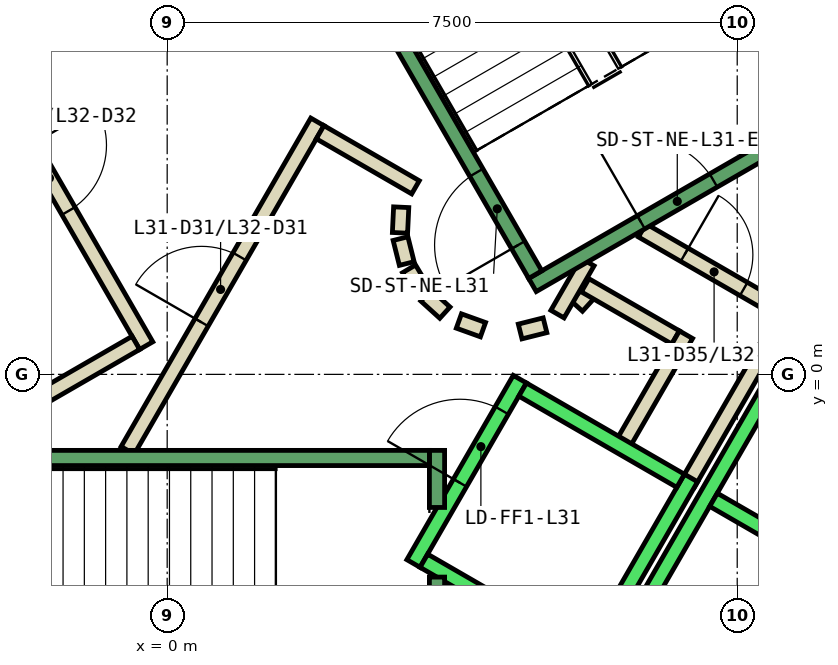
"""IFC4 building model, lengths in metres.
Left out: names, types, materials, properties, quantities, classifications, styles, units other than length and angle.
Written with IfcOpenShell. Run it as: python <this file> out.ifc"""

import sys

from ifc_helpers import new_model, si_unit, direction, frame, frame_2d, origin, place, context, subcontext, project, spatial, rectangle, extrude, element, fill, save


model = new_model("IFC4")
c1 = context("Model", 3, precision=1e-05, world=origin(), true_north=direction((0.0, 1.0)))
c2 = subcontext(c1, "Body", "Model", "MODEL_VIEW")
j1 = project(units=[si_unit("LENGTHUNIT", "METRE"), si_unit("PLANEANGLEUNIT", "RADIAN")], contexts=[c1])
p1 = place(None, origin())
s1 = spatial("IfcSite", under=j1, at=p1, CompositionType="ELEMENT")
p2 = place(p1, origin())
s2 = spatial("IfcBuilding", under=s1, at=p2, CompositionType="ELEMENT")
p3 = place(p2, frame((0.0, 0.0, 142.4)))
s3 = spatial("IfcBuildingStorey", under=s2, at=p3, CompositionType="ELEMENT", Elevation=142.4)
p4 = place(p3, frame((5.39, 0.898, 0.0), z_axis=(0.0, 0.0, 1.0), x_axis=(0.673828488714, 0.738887791073, 0.0)))
e1 = element("IfcWall", 1, at=p4, inside=s3, PredefinedType="PARTITIONING", context=c2, shape_type="SweptSolid", body=[
    extrude(rectangle(XDim=0.263, YDim=0.2, at=frame_2d((0.131, 0.0))), origin(), (0.0, 0.0, 1.0), 3.8),
])
p5 = place(p3, frame((5.499, 1.172, 0.0), z_axis=(0.0, 0.0, 1.0), x_axis=(0.866333505267, -0.499465972466, 0.0)))
e2 = element("IfcWall", 2, at=p5, inside=s3, PredefinedType="PARTITIONING", context=c2, shape_type="SweptSolid", body=[
    extrude(rectangle(XDim=1.374, YDim=0.2, at=frame_2d((0.687, 0.0))), origin(), (0.0, 0.0, 1.0), 3.8),
])
p6 = place(p3, frame((6.826, 0.522, 0.0), z_axis=(0.0, 0.0, 1.0), x_axis=(-0.500016722714, -0.866015748706, 0.0)))
e3 = element("IfcWall", 3, at=p6, inside=s3, PredefinedType="PARTITIONING", context=c2, shape_type="SweptSolid", body=[
    extrude(rectangle(XDim=1.7, YDim=0.2, at=frame_2d((0.85, 0.0))), origin(), (0.0, 0.0, 1.0), 3.8),
])
p7 = place(p3, frame((6.25, 1.894, 0.0), z_axis=(0.0, 0.0, 1.0), x_axis=(0.866043184279, -0.499969202016, 0.0)))
e4 = element("IfcWall", 4, at=p7, inside=s3, PredefinedType="PARTITIONING", context=c2, shape_type="SweptSolid", body=[
    extrude(rectangle(XDim=2.084, YDim=0.2, at=frame_2d((1.042, 0.0))), origin(), (0.0, 0.0, 1.0), 3.8),
])
p8 = place(p7, frame((0.642, 0.0, 0.0)))
e5 = element("IfcOpeningElement", 5, at=p8, cuts=e4, PredefinedType="OPENING", context=c2, shape_type="SweptSolid", body=[
    extrude(rectangle(XDim=0.9, YDim=2.1, at=frame_2d((0.45, 1.05))), frame((0.0, 0.11, 0.0), z_axis=(0.0, -1.0, 0.0), x_axis=(1.0, 0.0, 0.0)), (0.0, 0.0, 1.0), 0.22),
])
p9 = place(p3, frame((8.192, 0.888, 0.0), z_axis=(0.0, 0.0, 1.0), x_axis=(-0.499940625693, -0.866059680843, 0.0)))
e6 = element("IfcWall", 6, at=p9, inside=s3, PredefinedType="PARTITIONING", context=c2, shape_type="SweptSolid", body=[
    extrude(rectangle(XDim=2.68, YDim=0.2, at=frame_2d((1.34, 0.0))), origin(), (0.0, 0.0, 1.0), 3.8),
])
p10 = place(p3, frame((5.135, 0.793, 0.0), z_axis=(0.0, 0.0, 1.0), x_axis=(0.499526442893, 0.866298639529, 0.0)))
e7 = element("IfcWall", 7, at=p10, inside=s3, PredefinedType="PARTITIONING", context=c2, shape_type="SweptSolid", body=[
    extrude(rectangle(XDim=0.791, YDim=0.2, at=frame_2d((0.396, 0.0))), origin(), (0.0, 0.0, 1.0), 3.8),
])
p11 = place(p3, frame((-0.52, -1.0, 0.0), z_axis=(0.0, 0.0, 1.0), x_axis=(0.50011622646, 0.865958290007, 0.0)))
e8 = element("IfcWall", 8, at=p11, inside=s3, PredefinedType="PARTITIONING", context=c2, shape_type="SweptSolid", body=[
    extrude(rectangle(XDim=4.991, YDim=0.2, at=frame_2d((2.496, 0.0))), origin(), (0.0, 0.0, 1.0), 3.8),
])
p12 = place(p11, frame((1.945, 0.0, 0.0)))
e9 = element("IfcOpeningElement", 9, at=p12, cuts=e8, PredefinedType="OPENING", context=c2, shape_type="SweptSolid", body=[
    extrude(rectangle(XDim=1.0, YDim=2.1, at=frame_2d((0.5, 1.05))), frame((0.0, 0.11, 0.0), z_axis=(0.0, -1.0, 0.0), x_axis=(1.0, 0.0, 0.0)), (0.0, 0.0, 1.0), 0.22),
])
p13 = place(p3, frame((2.012, 3.186, 0.0), z_axis=(0.0, 0.0, 1.0), x_axis=(0.865891012941, -0.500232699559, 0.0)))
e10 = element("IfcWall", 10, at=p13, inside=s3, PredefinedType="PARTITIONING", context=c2, shape_type="SweptSolid", body=[
    extrude(rectangle(XDim=1.449, YDim=0.2, at=frame_2d((0.725, 0.0))), origin(), (0.0, 0.0, 1.0), 3.8),
])
p14 = place(p3, frame((3.079, 2.199, 0.0), z_axis=(0.0, 0.0, 1.0), x_axis=(-0.047771483479, -0.998858290933, 0.0)))
e11 = element("IfcWall", 11, at=p14, inside=s3, PredefinedType="PARTITIONING", context=c2, shape_type="SweptSolid", body=[
    extrude(rectangle(XDim=0.337, YDim=0.2, at=frame_2d((0.169, 0.0))), origin(), (0.0, 0.0, 1.0), 3.8),
])
p15 = place(p3, frame((3.07, 1.786, 0.0), z_axis=(0.0, 0.0, 1.0), x_axis=(0.242705583207, -0.970099994784, 0.0)))
e12 = element("IfcWall", 12, at=p15, inside=s3, PredefinedType="PARTITIONING", context=c2, shape_type="SweptSolid", body=[
    extrude(rectangle(XDim=0.338, YDim=0.2, at=frame_2d((0.169, 0.0))), origin(), (0.0, 0.0, 1.0), 3.8),
])
for number, where, z_axis, x_axis in (
    (13, (3.182, 1.388, 0.0), (0.0, 0.0, 1.0), (0.512, -0.859, 0.0)),
    (14, (3.404, 1.039, 0.0), (0.0, 0.0, 1.0), (0.74, -0.672, 0.0)),
):
    element("IfcWall", number, at=place(p3, frame(where, z_axis=z_axis, x_axis=x_axis)), inside=s3, PredefinedType="PARTITIONING", context=c2, shape_type="SweptSolid", body=[
        extrude(rectangle(XDim=0.338, YDim=0.2, at=frame_2d((0.169, 0.0))), origin(), (0.0, 0.0, 1.0), 3.8),
    ])
p16 = place(p3, frame((3.838, 0.702, 0.0), z_axis=(0.0, 0.0, 1.0), x_axis=(0.941035081519, -0.338308993895, 0.0)))
e15 = element("IfcWall", 15, at=p16, inside=s3, PredefinedType="PARTITIONING", context=c2, shape_type="SweptSolid", body=[
    extrude(rectangle(XDim=0.337, YDim=0.2, at=frame_2d((0.168, 0.0))), origin(), (0.0, 0.0, 1.0), 3.8),
])
p17 = place(p3, frame((4.644, 0.564, 0.0), z_axis=(0.0, 0.0, 1.0), x_axis=(0.969929076366, 0.243387729394, 0.0)))
e16 = element("IfcWall", 16, at=p17, inside=s3, PredefinedType="PARTITIONING", context=c2, shape_type="SweptSolid", body=[
    extrude(rectangle(XDim=0.337, YDim=0.2, at=frame_2d((0.168, 0.0))), origin(), (0.0, 0.0, 1.0), 3.8),
])
p18 = place(p3, frame((-2.771, 4.7, 0.0), z_axis=(0.0, 0.0, 1.0), x_axis=(0.499969479948, -0.866043023828, 0.0)))
e17 = element("IfcWall", 17, at=p18, inside=s3, PredefinedType="PARTITIONING", context=c2, shape_type="SweptSolid", body=[
    extrude(rectangle(XDim=4.99, YDim=0.2, at=frame_2d((2.495, 0.0))), origin(), (0.0, 0.0, 1.0), 3.8),
])
p19 = place(p18, frame((1.945, 0.0, 0.0)))
e18 = element("IfcOpeningElement", 18, at=p19, cuts=e17, PredefinedType="OPENING", context=c2, shape_type="SweptSolid", body=[
    extrude(rectangle(XDim=1.0, YDim=2.1, at=frame_2d((0.5, 1.05))), frame((0.0, 0.11, 0.0), z_axis=(0.0, -1.0, 0.0), x_axis=(1.0, 0.0, 0.0)), (0.0, 0.0, 1.0), 0.22),
])
p20 = place(p3, frame((-0.412, 0.414, 0.0), z_axis=(0.0, 0.0, 1.0), x_axis=(-0.866017369001, -0.500013916395, 0.0)))
e19 = element("IfcWall", 19, at=p20, inside=s3, PredefinedType="PARTITIONING", context=c2, shape_type="SweptSolid", body=[
    extrude(rectangle(XDim=1.45, YDim=0.2, at=frame_2d((0.725, 0.0))), origin(), (0.0, 0.0, 1.0), 3.8),
])
p21 = place(p3, frame((3.24, -2.488, 0.0), z_axis=(0.0, 0.0, 1.0), x_axis=(0.49994636267, 0.866056369097, 0.0)))
e20 = element("IfcWall", 20, at=p21, inside=s3, PredefinedType="STANDARD", context=c2, shape_type="SweptSolid", body=[
    extrude(rectangle(XDim=2.8, YDim=0.2, at=frame_2d((1.4, 0.0))), origin(), (0.0, 0.0, 1.0), 3.8),
])
p22 = place(p21, frame((1.225, 0.0, 0.0)))
e21 = element("IfcOpeningElement", 21, at=p22, cuts=e20, PredefinedType="OPENING", context=c2, shape_type="SweptSolid", body=[
    extrude(rectangle(XDim=1.1, YDim=2.1, at=frame_2d((0.55, 1.05))), frame((0.0, 0.11, 0.0), z_axis=(0.0, -1.0, 0.0), x_axis=(1.0, 0.0, 0.0)), (0.0, 0.0, 1.0), 0.22),
])
p23 = place(p3, frame((5.492, -3.788, 0.0), z_axis=(0.0, 0.0, 1.0), x_axis=(0.500011755427, 0.866018616679, 0.0)))
e22 = element("IfcWall", 22, at=p23, inside=s3, PredefinedType="STANDARD", context=c2, shape_type="SweptSolid", body=[
    extrude(rectangle(XDim=2.8, YDim=0.2, at=frame_2d((1.4, 0.0))), origin(), (0.0, 0.0, 1.0), 3.8),
])
p24 = place(p3, frame((3.377, -2.452, 0.0), z_axis=(0.0, 0.0, 1.0), x_axis=(0.865955154139, -0.50012165622, 0.0)))
e23 = element("IfcWall", 23, at=p24, inside=s3, PredefinedType="STANDARD", context=c2, shape_type="SweptSolid", body=[
    extrude(rectangle(XDim=2.4, YDim=0.2, at=frame_2d((1.2, 0.0))), origin(), (0.0, 0.0, 1.0), 3.8),
])
p25 = place(p3, frame((4.677, -0.2, 0.0), z_axis=(0.0, 0.0, 1.0), x_axis=(0.865973769406, -0.500089422704, 0.0)))
e24 = element("IfcWall", 24, at=p25, inside=s3, PredefinedType="STANDARD", context=c2, shape_type="SweptSolid", body=[
    extrude(rectangle(XDim=2.399, YDim=0.2, at=frame_2d((1.2, 0.0))), origin(), (0.0, 0.0, 1.0), 3.8),
])
p26 = place(p3, frame((4.451, -6.19, 0.0), z_axis=(0.0, 0.0, 1.0), x_axis=(0.50000090737, 0.866024879913, 0.0)))
e25 = element("IfcWall", 25, at=p26, inside=s3, PredefinedType="STANDARD", context=c2, shape_type="SweptSolid", body=[
    extrude(rectangle(XDim=10.6, YDim=0.2, at=frame_2d((5.3, 0.0))), origin(), (0.0, 0.0, 1.0), 3.8),
])
p27 = place(p3, frame((7.188, -1.65, 0.0), z_axis=(0.0, 0.0, 1.0), x_axis=(0.866022959057, -0.500004234368, 0.0)))
e26 = element("IfcWall", 26, at=p27, inside=s3, PredefinedType="STANDARD", context=c2, shape_type="SweptSolid", body=[
    extrude(rectangle(XDim=2.5, YDim=0.2, at=frame_2d((1.25, 0.0))), origin(), (0.0, 0.0, 1.0), 3.8),
])
p28 = place(p3, frame((3.55, -2.667, 0.0), z_axis=(0.0, 0.0, 1.0), x_axis=(0.0, -1.0, 0.0)))
e27 = element("IfcWall", 27, at=p28, inside=s3, PredefinedType="STANDARD", context=c2, shape_type="SweptSolid", body=[
    extrude(rectangle(XDim=2.733, YDim=0.2, at=frame_2d((1.366, 0.0))), origin(), (0.0, 0.0, 1.0), 3.8),
])
p29 = place(p3, frame((3.55, -1.0, 0.0), z_axis=(0.0, 0.0, 1.0), x_axis=(0.0, -1.0, 0.0)))
e28 = element("IfcWall", 28, at=p29, inside=s3, PredefinedType="STANDARD", context=c2, shape_type="SweptSolid", body=[
    extrude(rectangle(XDim=0.751, YDim=0.2, at=frame_2d((0.375, 0.0))), origin(), (0.0, 0.0, 1.0), 3.8),
])
p30 = place(p3, frame((-3.45, -1.1, 0.0), z_axis=(0.0, 0.0, 1.0), x_axis=(1.0, 0.0, 0.0)))
e29 = element("IfcWall", 29, at=p30, inside=s3, PredefinedType="STANDARD", context=c2, shape_type="SweptSolid", body=[
    extrude(rectangle(XDim=6.9, YDim=0.2, at=frame_2d((3.45, 0.0))), origin(), (0.0, 0.0, 1.0), 3.8),
])
p31 = place(p30, frame((0.45, 0.0, 0.0)))
e30 = element("IfcOpeningElement", 30, at=p31, cuts=e29, PredefinedType="OPENING", context=c2, shape_type="SweptSolid", body=[
    extrude(rectangle(XDim=1.1, YDim=2.2, at=frame_2d((0.55, 1.1))), frame((0.0, 0.11, 0.0), z_axis=(0.0, -1.0, 0.0), x_axis=(1.0, 0.0, 0.0)), (0.0, 0.0, 1.0), 0.22),
])
p32 = place(p3, frame((4.806, 1.176, 0.0), z_axis=(0.0, 0.0, 1.0), x_axis=(0.866059941101, 0.499940174841, 0.0)))
e31 = element("IfcWall", 31, at=p32, inside=s3, PredefinedType="STANDARD", context=c2, shape_type="SweptSolid", body=[
    extrude(rectangle(XDim=4.4, YDim=0.2, at=frame_2d((2.2, 0.0))), origin(), (0.0, 0.0, 1.0), 3.8),
])
p33 = place(p32, frame((1.65, 0.0, 0.0)))
e32 = element("IfcOpeningElement", 32, at=p33, cuts=e31, PredefinedType="OPENING", context=c2, shape_type="SweptSolid", body=[
    extrude(rectangle(XDim=1.1, YDim=2.2, at=frame_2d((0.55, 1.1))), frame((0.0, 0.11, 0.0), z_axis=(0.0, -1.0, 0.0), x_axis=(1.0, 0.0, 0.0)), (0.0, 0.0, 1.0), 0.22),
])
p34 = place(p3, frame((4.843, 1.312, 0.0), z_axis=(0.0, 0.0, 1.0), x_axis=(-0.499963383562, 0.866046543262, 0.0)))
e33 = element("IfcWall", 33, at=p34, inside=s3, PredefinedType="STANDARD", context=c2, shape_type="SweptSolid", body=[
    extrude(rectangle(XDim=6.9, YDim=0.2, at=frame_2d((3.45, 0.0))), origin(), (0.0, 0.0, 1.0), 3.8),
])
p35 = place(p34, frame((0.45, 0.0, 0.0)))
e34 = element("IfcOpeningElement", 34, at=p35, cuts=e33, PredefinedType="OPENING", context=c2, shape_type="SweptSolid", body=[
    extrude(rectangle(XDim=1.1, YDim=2.2, at=frame_2d((0.55, 1.1))), frame((0.0, 0.11, 0.0), z_axis=(0.0, -1.0, 0.0), x_axis=(1.0, 0.0, 0.0)), (0.0, 0.0, 1.0), 0.22),
])
p36 = place(p3, frame((8.48, 3.412, 0.0), z_axis=(0.0, 0.0, 1.0), x_axis=(-0.499978703459, 0.866037698999, 0.0)))
e35 = element("IfcWall", 35, at=p36, inside=s3, PredefinedType="STANDARD", context=c2, shape_type="SweptSolid", body=[
    extrude(rectangle(XDim=6.9, YDim=0.2, at=frame_2d((3.45, 0.0))), origin(), (0.0, 0.0, 1.0), 3.8),
])
p37 = place(p3, frame((-1.393, 7.288, 0.0), z_axis=(0.0, 0.0, 1.0), x_axis=(-0.499963383562, -0.866046543262, 0.0)))
e36 = element("IfcWall", 36, at=p37, inside=s3, PredefinedType="STANDARD", context=c2, shape_type="SweptSolid", body=[
    extrude(rectangle(XDim=6.9, YDim=0.2, at=frame_2d((3.45, 0.0))), origin(), (0.0, 0.0, 1.0), 3.8),
])
p38 = place(p37, frame((0.45, 0.0, 0.0)))
e37 = element("IfcOpeningElement", 37, at=p38, cuts=e36, PredefinedType="OPENING", context=c2, shape_type="SweptSolid", body=[
    extrude(rectangle(XDim=1.1, YDim=2.2, at=frame_2d((0.55, 1.1))), frame((0.0, 0.11, 0.0), z_axis=(0.0, -1.0, 0.0), x_axis=(1.0, 0.0, 0.0)), (0.0, 0.0, 1.0), 0.22),
])
p39 = place(p12, origin())
e38 = element("IfcDoor", 38, at=p39, inside=s3, OperationType="SINGLE_SWING_LEFT", PredefinedType="DOOR", context=c2, shape_type="SweptSolid", body=[
    extrude(rectangle(XDim=1.0, YDim=2.1, at=frame_2d((0.5, 1.05))), frame((0.0, 0.025, 0.0), z_axis=(0.0, -1.0, 0.0), x_axis=(1.0, 0.0, 0.0)), (0.0, 0.0, 1.0), 0.05),
])
fill(e9, e38)
p40 = place(p19, origin())
e39 = element("IfcDoor", 39, at=p40, inside=s3, OperationType="SINGLE_SWING_RIGHT", PredefinedType="DOOR", context=c2, shape_type="SweptSolid", body=[
    extrude(rectangle(XDim=1.0, YDim=2.1, at=frame_2d((0.5, 1.05))), frame((0.0, 0.025, 0.0), z_axis=(0.0, -1.0, 0.0), x_axis=(1.0, 0.0, 0.0)), (0.0, 0.0, 1.0), 0.05),
])
fill(e18, e39)
p41 = place(p8, origin())
e40 = element("IfcDoor", 40, at=p41, inside=s3, OperationType="SINGLE_SWING_LEFT", PredefinedType="DOOR", context=c2, shape_type="SweptSolid", body=[
    extrude(rectangle(XDim=0.9, YDim=2.1, at=frame_2d((0.45, 1.05))), frame((0.0, 0.025, 0.0), z_axis=(0.0, -1.0, 0.0), x_axis=(1.0, 0.0, 0.0)), (0.0, 0.0, 1.0), 0.05),
])
fill(e5, e40)
p42 = place(p22, origin())
e41 = element("IfcDoor", 41, at=p42, inside=s3, OperationType="SLIDING_TO_LEFT", PredefinedType="DOOR", context=c2, shape_type="SweptSolid", body=[
    extrude(rectangle(XDim=1.1, YDim=2.1, at=frame_2d((0.55, 1.05))), frame((0.0, 0.025, 0.0), z_axis=(0.0, -1.0, 0.0), x_axis=(1.0, 0.0, 0.0)), (0.0, 0.0, 1.0), 0.05),
])
fill(e21, e41)
p43 = place(p35, origin())
e42 = element("IfcDoor", 42, at=p43, inside=s3, OperationType="SINGLE_SWING_LEFT", PredefinedType="DOOR", context=c2, shape_type="SweptSolid", body=[
    extrude(rectangle(XDim=1.1, YDim=2.2, at=frame_2d((0.55, 1.1))), frame((0.0, 0.025, 0.0), z_axis=(0.0, -1.0, 0.0), x_axis=(1.0, 0.0, 0.0)), (0.0, 0.0, 1.0), 0.05),
])
fill(e34, e42)
p44 = place(p33, origin())
e43 = element("IfcDoor", 43, at=p44, inside=s3, OperationType="SINGLE_SWING_LEFT", PredefinedType="DOOR", context=c2, shape_type="SweptSolid", body=[
    extrude(rectangle(XDim=1.1, YDim=2.2, at=frame_2d((0.55, 1.1))), frame((0.0, 0.025, 0.0), z_axis=(0.0, -1.0, 0.0), x_axis=(1.0, 0.0, 0.0)), (0.0, 0.0, 1.0), 0.05),
])
fill(e32, e43)
save(model, sys.argv[1])
